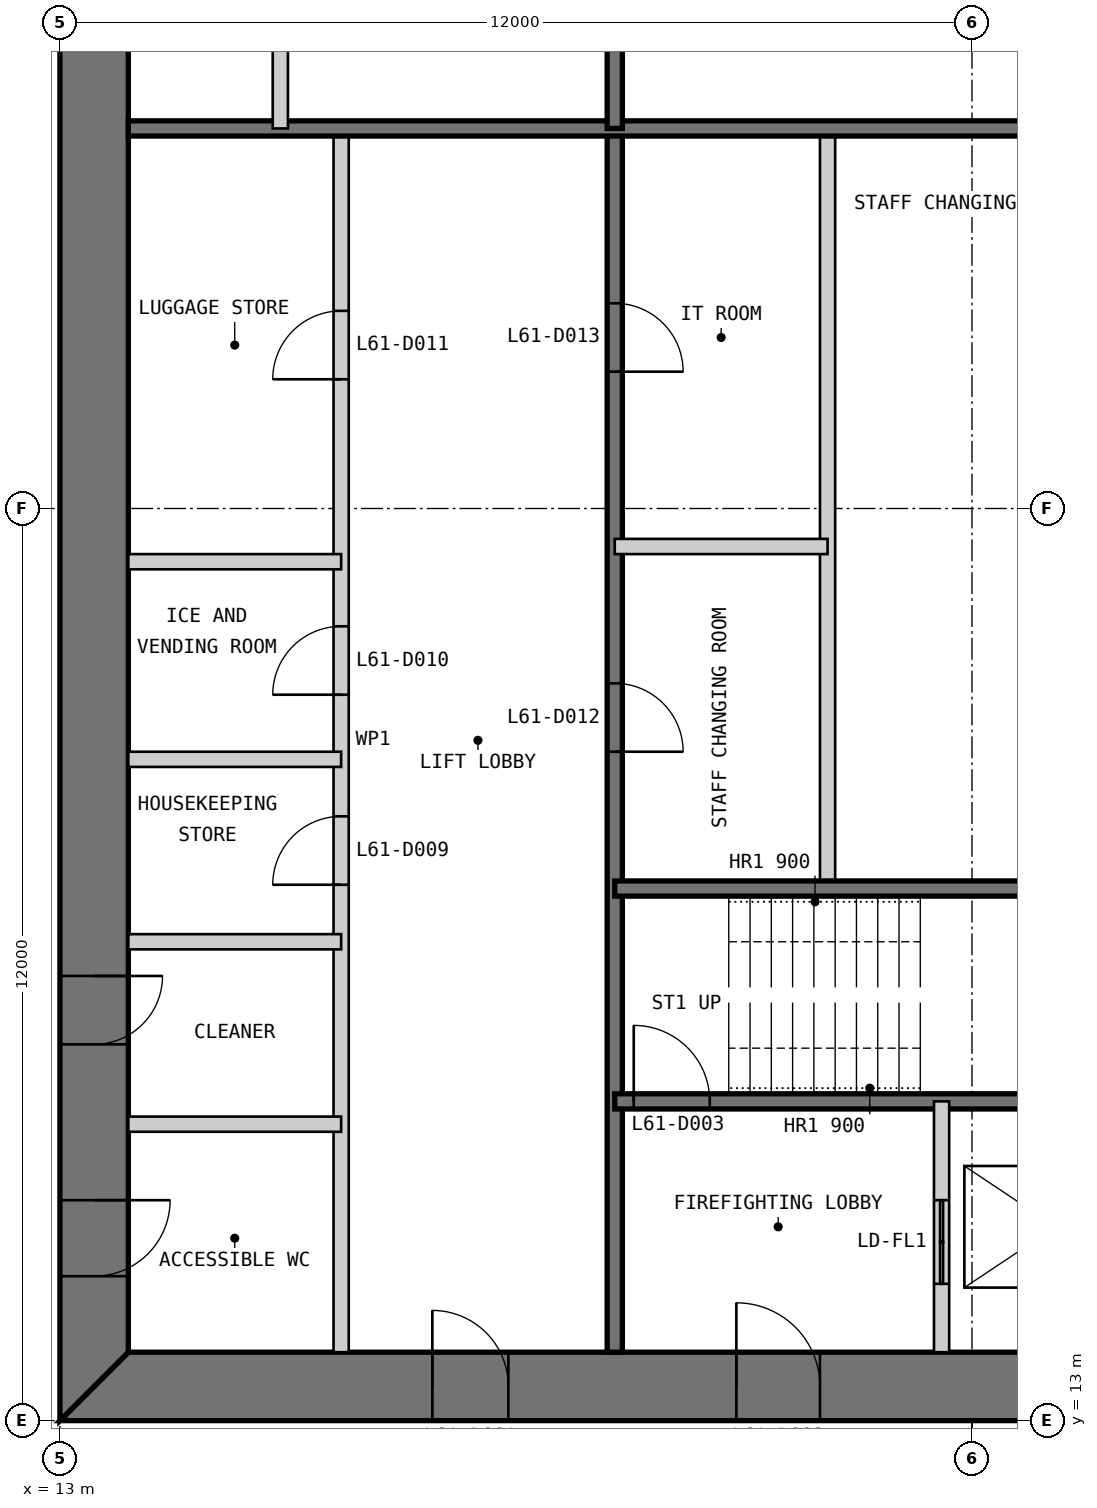
"""IFC4 building model, lengths in metres.
Left out: names, types, materials, properties, quantities, classifications, styles, units other than length and angle.
Written with IfcOpenShell. Run it as: python <this file> out.ifc"""

import sys

from ifc_helpers import new_model, si_unit, direction, frame, frame_2d, origin, place, context, subcontext, project, spatial, polyline, rectangle, outline, extrude, element, fill, save


model = new_model("IFC4")
c1 = context("Model", 3, precision=1e-05, world=origin(), true_north=direction((0.0, 1.0)))
c2 = subcontext(c1, "Body", "Model", "MODEL_VIEW")
j1 = project(units=[si_unit("LENGTHUNIT", "METRE"), si_unit("PLANEANGLEUNIT", "RADIAN")], contexts=[c1])
p1 = place(None, origin())
s1 = spatial("IfcSite", under=j1, at=p1, CompositionType="ELEMENT")
p2 = place(p1, origin())
s2 = spatial("IfcBuilding", under=s1, at=p2, CompositionType="ELEMENT")
p3 = place(p2, frame((0.0, 0.0, 259.4)))
s3 = spatial("IfcBuildingStorey", under=s2, at=p3, CompositionType="ELEMENT", Elevation=259.4)
p4 = place(p3, frame((13.0, 13.45, 0.0), z_axis=(0.0, 0.0, 1.0), x_axis=(1.0, 0.0, 0.0)))
e1 = element("IfcWall", 1, at=p4, inside=s3, PredefinedType="SHEAR", context=c2, shape_type="SweptSolid", body=[
    extrude(outline(polyline([(0.0, -0.45), (24.0, -0.45), (23.1, 0.45), (0.9, 0.45), (0.0, -0.45)])), origin(), (0.0, 0.0, 1.0), 3.4),
])
p5 = place(p4, frame((4.9, 0.0, 0.0)))
e2 = element("IfcOpeningElement", 2, at=p5, cuts=e1, PredefinedType="OPENING", context=c2, shape_type="SweptSolid", body=[
    extrude(rectangle(XDim=1.0, YDim=2.2, at=frame_2d((0.5, 1.1))), frame((0.0, 0.46, 0.0), z_axis=(0.0, -1.0, 0.0), x_axis=(1.0, 0.0, 0.0)), (0.0, 0.0, 1.0), 0.92),
])
p6 = place(p4, frame((8.9, 0.0, 0.0)))
e3 = element("IfcOpeningElement", 3, at=p6, cuts=e1, PredefinedType="OPENING", context=c2, shape_type="SweptSolid", body=[
    extrude(rectangle(XDim=1.1, YDim=2.2, at=frame_2d((0.55, 1.1))), frame((0.0, 0.46, 0.0), z_axis=(0.0, -1.0, 0.0), x_axis=(1.0, 0.0, 0.0)), (0.0, 0.0, 1.0), 0.92),
])
p7 = place(p4, frame((15.05, 0.0, 0.0)))
e4 = element("IfcOpeningElement", 4, at=p7, cuts=e1, PredefinedType="OPENING", context=c2, shape_type="SweptSolid", body=[
    extrude(rectangle(XDim=0.9, YDim=2.2, at=frame_2d((0.45, 1.1))), frame((0.0, 0.46, 0.0), z_axis=(0.0, -1.0, 0.0), x_axis=(1.0, 0.0, 0.0)), (0.0, 0.0, 1.0), 0.92),
])
p8 = place(p4, frame((17.9, 0.0, 0.0)))
e5 = element("IfcOpeningElement", 5, at=p8, cuts=e1, PredefinedType="OPENING", context=c2, shape_type="SweptSolid", body=[
    extrude(rectangle(XDim=1.0, YDim=2.2, at=frame_2d((0.5, 1.1))), frame((0.0, 0.46, 0.0), z_axis=(0.0, -1.0, 0.0), x_axis=(1.0, 0.0, 0.0)), (0.0, 0.0, 1.0), 0.92),
])
p9 = place(p4, frame((21.4, 0.0, 0.0)))
e6 = element("IfcOpeningElement", 6, at=p9, cuts=e1, PredefinedType="OPENING", context=c2, shape_type="SweptSolid", body=[
    extrude(rectangle(XDim=1.0, YDim=2.2, at=frame_2d((0.5, 1.1))), frame((0.0, 0.46, 0.0), z_axis=(0.0, -1.0, 0.0), x_axis=(1.0, 0.0, 0.0)), (0.0, 0.0, 1.0), 0.92),
])
p10 = place(p3, frame((13.45, 36.1, 0.0), z_axis=(0.0, 0.0, 1.0), x_axis=(0.0, -1.0, 0.0)))
e7 = element("IfcWall", 7, at=p10, inside=s3, PredefinedType="SHEAR", context=c2, shape_type="SweptSolid", body=[
    extrude(outline(polyline([(-0.9, -0.45), (23.1, -0.45), (22.2, 0.45), (0.0, 0.45), (-0.9, -0.45)])), origin(), (0.0, 0.0, 1.0), 3.4),
])
p11 = place(p10, frame((20.2, 0.0, 0.0)))
e8 = element("IfcOpeningElement", 8, at=p11, cuts=e7, PredefinedType="OPENING", context=c2, shape_type="SweptSolid", body=[
    extrude(rectangle(XDim=1.0, YDim=2.2, at=frame_2d((0.5, 1.1))), frame((0.0, 0.46, 0.0), z_axis=(0.0, -1.0, 0.0), x_axis=(1.0, 0.0, 0.0)), (0.0, 0.0, 1.0), 0.92),
])
p12 = place(p10, frame((17.25, 0.0, 0.0)))
e9 = element("IfcOpeningElement", 9, at=p12, cuts=e7, PredefinedType="OPENING", context=c2, shape_type="SweptSolid", body=[
    extrude(rectangle(XDim=0.9, YDim=2.2, at=frame_2d((0.45, 1.1))), frame((0.0, 0.46, 0.0), z_axis=(0.0, -1.0, 0.0), x_axis=(1.0, 0.0, 0.0)), (0.0, 0.0, 1.0), 0.92),
])
p13 = place(p3, frame((16.7, 13.9, 0.0), z_axis=(0.0, 0.0, 1.0), x_axis=(0.0, 1.0, 0.0)))
e10 = element("IfcWall", 10, at=p13, inside=s3, PredefinedType="PARTITIONING", context=c2, shape_type="SweptSolid", body=[
    extrude(rectangle(XDim=16.1, YDim=0.2, at=frame_2d((8.05, 0.0))), origin(), (0.0, 0.0, 1.0), 3.2),
])
p14 = place(p13, frame((6.15, 0.0, 0.0)))
e11 = element("IfcOpeningElement", 11, at=p14, cuts=e10, PredefinedType="OPENING", context=c2, shape_type="SweptSolid", body=[
    extrude(rectangle(XDim=0.9, YDim=2.2, at=frame_2d((0.45, 1.1))), frame((0.0, 0.11, 0.0), z_axis=(0.0, -1.0, 0.0), x_axis=(1.0, 0.0, 0.0)), (0.0, 0.0, 1.0), 0.22),
])
p15 = place(p13, frame((8.65, 0.0, 0.0)))
e12 = element("IfcOpeningElement", 12, at=p15, cuts=e10, PredefinedType="OPENING", context=c2, shape_type="SweptSolid", body=[
    extrude(rectangle(XDim=0.9, YDim=2.2, at=frame_2d((0.45, 1.1))), frame((0.0, 0.11, 0.0), z_axis=(0.0, -1.0, 0.0), x_axis=(1.0, 0.0, 0.0)), (0.0, 0.0, 1.0), 0.22),
])
p16 = place(p13, frame((12.8, 0.0, 0.0)))
e13 = element("IfcOpeningElement", 13, at=p16, cuts=e10, PredefinedType="OPENING", context=c2, shape_type="SweptSolid", body=[
    extrude(rectangle(XDim=0.9, YDim=2.2, at=frame_2d((0.45, 1.1))), frame((0.0, 0.11, 0.0), z_axis=(0.0, -1.0, 0.0), x_axis=(1.0, 0.0, 0.0)), (0.0, 0.0, 1.0), 0.22),
])
p17 = place(p3, frame((20.3, 13.9, 0.0), z_axis=(0.0, 0.0, 1.0), x_axis=(0.0, 1.0, 0.0)))
e14 = element("IfcWall", 14, at=p17, inside=s3, PredefinedType="SOLIDWALL", context=c2, shape_type="SweptSolid", body=[
    extrude(rectangle(XDim=16.1, YDim=0.2, at=frame_2d((8.05, 0.0))), origin(), (0.0, 0.0, 1.0), 3.2),
])
p18 = place(p17, frame((7.9, 0.0, 0.0)))
e15 = element("IfcOpeningElement", 15, at=p18, cuts=e14, PredefinedType="OPENING", context=c2, shape_type="SweptSolid", body=[
    extrude(rectangle(XDim=0.9, YDim=2.2, at=frame_2d((0.45, 1.1))), frame((0.0, 0.11, 0.0), z_axis=(0.0, -1.0, 0.0), x_axis=(1.0, 0.0, 0.0)), (0.0, 0.0, 1.0), 0.22),
])
p19 = place(p17, frame((12.9, 0.0, 0.0)))
e16 = element("IfcOpeningElement", 16, at=p19, cuts=e14, PredefinedType="OPENING", context=c2, shape_type="SweptSolid", body=[
    extrude(rectangle(XDim=0.9, YDim=2.2, at=frame_2d((0.45, 1.1))), frame((0.0, 0.11, 0.0), z_axis=(0.0, -1.0, 0.0), x_axis=(1.0, 0.0, 0.0)), (0.0, 0.0, 1.0), 0.22),
])
p20 = place(p3, frame((23.1, 20.0, 0.0), z_axis=(0.0, 0.0, 1.0), x_axis=(0.0, 1.0, 0.0)))
e17 = element("IfcWall", 17, at=p20, inside=s3, PredefinedType="PARTITIONING", context=c2, shape_type="SweptSolid", body=[
    extrude(rectangle(XDim=10.0, YDim=0.2, at=frame_2d((5.0, 0.0))), origin(), (0.0, 0.0, 1.0), 3.2),
])
p21 = place(p3, frame((20.3, 17.2, 0.0), z_axis=(0.0, 0.0, 1.0), x_axis=(1.0, 0.0, 0.0)))
e18 = element("IfcWall", 18, at=p21, inside=s3, PredefinedType="SOLIDWALL", context=c2, shape_type="SweptSolid", body=[
    extrude(rectangle(XDim=9.4, YDim=0.2, at=frame_2d((4.7, 0.0))), origin(), (0.0, 0.0, 1.0), 3.2),
])
p22 = place(p21, frame((0.25, 0.0, 0.0)))
e19 = element("IfcOpeningElement", 19, at=p22, cuts=e18, PredefinedType="OPENING", context=c2, shape_type="SweptSolid", body=[
    extrude(rectangle(XDim=1.0, YDim=2.2, at=frame_2d((0.5, 1.1))), frame((0.0, 0.11, 0.0), z_axis=(0.0, -1.0, 0.0), x_axis=(1.0, 0.0, 0.0)), (0.0, 0.0, 1.0), 0.22),
])
p23 = place(p3, frame((20.3, 20.0, 0.0), z_axis=(0.0, 0.0, 1.0), x_axis=(1.0, 0.0, 0.0)))
e20 = element("IfcWall", 20, at=p23, inside=s3, PredefinedType="SOLIDWALL", context=c2, shape_type="SweptSolid", body=[
    extrude(rectangle(XDim=15.8, YDim=0.2, at=frame_2d((7.9, 0.0))), origin(), (0.0, 0.0, 1.0), 3.2),
])
p24 = place(p3, frame((24.6, 13.9, 0.0), z_axis=(0.0, 0.0, 1.0), x_axis=(0.0, 1.0, 0.0)))
e21 = element("IfcWall", 21, at=p24, inside=s3, PredefinedType="PARTITIONING", context=c2, shape_type="SweptSolid", body=[
    extrude(rectangle(XDim=3.3, YDim=0.2, at=frame_2d((1.65, 0.0))), origin(), (0.0, 0.0, 1.0), 3.2),
])
p25 = place(p24, frame((0.9, 0.0, 0.0)))
e22 = element("IfcOpeningElement", 22, at=p25, cuts=e21, PredefinedType="OPENING", context=c2, shape_type="SweptSolid", body=[
    extrude(rectangle(XDim=1.1, YDim=2.2, at=frame_2d((0.55, 1.1))), frame((0.0, 0.11, 0.0), z_axis=(0.0, -1.0, 0.0), x_axis=(1.0, 0.0, 0.0)), (0.0, 0.0, 1.0), 0.22),
])
for number, where, z_axis, x_axis in (
    (23, (13.9, 16.9, 0.0), (0.0, 0.0, 1.0), (1.0, 0.0, 0.0)),
    (24, (13.9, 19.3, 0.0), (0.0, 0.0, 1.0), (1.0, 0.0, 0.0)),
    (25, (13.9, 21.7, 0.0), (0.0, 0.0, 1.0), (1.0, 0.0, 0.0)),
    (26, (13.9, 24.3, 0.0), (0.0, 0.0, 1.0), (1.0, 0.0, 0.0)),
    (27, (20.3, 24.5, 0.0), (0.0, 0.0, 1.0), (1.0, 0.0, 0.0)),
):
    element("IfcWall", number, at=place(p3, frame(where, z_axis=z_axis, x_axis=x_axis)), inside=s3, PredefinedType="PARTITIONING", context=c2, shape_type="SweptSolid", body=[
        extrude(rectangle(XDim=2.8, YDim=0.2, at=frame_2d((1.4, 0.0))), origin(), (0.0, 0.0, 1.0), 3.2),
    ])
p26 = place(p3, frame((29.7, 30.0, 0.0), z_axis=(0.0, 0.0, 1.0), x_axis=(-1.0, 0.0, 0.0)))
e28 = element("IfcWall", 28, at=p26, inside=s3, PredefinedType="SOLIDWALL", context=c2, shape_type="SweptSolid", body=[
    extrude(rectangle(XDim=15.8, YDim=0.2, at=frame_2d((7.9, 0.0))), origin(), (0.0, 0.0, 1.0), 3.2),
])
p27 = place(p3, frame((20.3, 36.1, 0.0), z_axis=(0.0, 0.0, 1.0), x_axis=(0.0, -1.0, 0.0)))
e29 = element("IfcWall", 29, at=p27, inside=s3, PredefinedType="SOLIDWALL", context=c2, shape_type="SweptSolid", body=[
    extrude(rectangle(XDim=6.1, YDim=0.2, at=frame_2d((3.05, 0.0))), origin(), (0.0, 0.0, 1.0), 3.2),
])
p28 = place(p3, frame((15.9, 36.1, 0.0), z_axis=(0.0, 0.0, 1.0), x_axis=(0.0, -1.0, 0.0)))
e30 = element("IfcWall", 30, at=p28, inside=s3, PredefinedType="PARTITIONING", context=c2, shape_type="SweptSolid", body=[
    extrude(rectangle(XDim=6.1, YDim=0.2, at=frame_2d((3.05, 0.0))), origin(), (0.0, 0.0, 1.0), 3.2),
])
p29 = place(p5, origin())
e31 = element("IfcDoor", 31, at=p29, inside=s3, OperationType="SINGLE_SWING_LEFT", PredefinedType="DOOR", context=c2, shape_type="SweptSolid", body=[
    extrude(rectangle(XDim=1.0, YDim=2.2, at=frame_2d((0.5, 1.1))), frame((0.0, 0.025, 0.0), z_axis=(0.0, -1.0, 0.0), x_axis=(1.0, 0.0, 0.0)), (0.0, 0.0, 1.0), 0.05),
    extrude(outline(polyline([(0.0, 0.0), (0.04, 0.0), (0.04, 2.16), (0.96, 2.16), (0.96, 0.0), (1.0, 0.0), (1.0, 2.2), (0.0, 2.2), (0.0, 0.0)])), frame((0.0, 0.3, 0.0), z_axis=(0.0, -1.0, 0.0), x_axis=(1.0, 0.0, 0.0)), (0.0, 0.0, 1.0), 0.6),
])
fill(e2, e31)
p30 = place(p6, origin())
e32 = element("IfcDoor", 32, at=p30, inside=s3, OperationType="SINGLE_SWING_LEFT", PredefinedType="DOOR", context=c2, shape_type="SweptSolid", body=[
    extrude(rectangle(XDim=1.1, YDim=2.2, at=frame_2d((0.55, 1.1))), frame((0.0, 0.025, 0.0), z_axis=(0.0, -1.0, 0.0), x_axis=(1.0, 0.0, 0.0)), (0.0, 0.0, 1.0), 0.05),
    extrude(outline(polyline([(0.0, 0.0), (0.04, 0.0), (0.04, 2.16), (1.06, 2.16), (1.06, 0.0), (1.1, 0.0), (1.1, 2.2), (0.0, 2.2), (0.0, 0.0)])), frame((0.0, 0.3, 0.0), z_axis=(0.0, -1.0, 0.0), x_axis=(1.0, 0.0, 0.0)), (0.0, 0.0, 1.0), 0.6),
])
fill(e3, e32)
p31 = place(p22, origin())
e33 = element("IfcDoor", 33, at=p31, inside=s3, OperationType="SINGLE_SWING_LEFT", PredefinedType="DOOR", context=c2, shape_type="SweptSolid", body=[
    extrude(rectangle(XDim=1.0, YDim=2.2, at=frame_2d((0.5, 1.1))), frame((0.0, 0.025, 0.0), z_axis=(0.0, -1.0, 0.0), x_axis=(1.0, 0.0, 0.0)), (0.0, 0.0, 1.0), 0.05),
])
fill(e19, e33)
p32 = place(p11, origin())
e34 = element("IfcDoor", 34, at=p32, inside=s3, OperationType="SINGLE_SWING_LEFT", PredefinedType="DOOR", context=c2, shape_type="SweptSolid", body=[
    extrude(rectangle(XDim=1.0, YDim=2.2, at=frame_2d((0.5, 1.1))), frame((0.0, 0.025, 0.0), z_axis=(0.0, -1.0, 0.0), x_axis=(1.0, 0.0, 0.0)), (0.0, 0.0, 1.0), 0.05),
    extrude(outline(polyline([(0.0, 0.0), (0.04, 0.0), (0.04, 2.16), (0.96, 2.16), (0.96, 0.0), (1.0, 0.0), (1.0, 2.2), (0.0, 2.2), (0.0, 0.0)])), frame((0.0, 0.3, 0.0), z_axis=(0.0, -1.0, 0.0), x_axis=(1.0, 0.0, 0.0)), (0.0, 0.0, 1.0), 0.6),
])
fill(e8, e34)
p33 = place(p12, origin())
e35 = element("IfcDoor", 35, at=p33, inside=s3, OperationType="SINGLE_SWING_LEFT", PredefinedType="DOOR", context=c2, shape_type="SweptSolid", body=[
    extrude(rectangle(XDim=0.9, YDim=2.2, at=frame_2d((0.45, 1.1))), frame((0.0, 0.025, 0.0), z_axis=(0.0, -1.0, 0.0), x_axis=(1.0, 0.0, 0.0)), (0.0, 0.0, 1.0), 0.05),
    extrude(outline(polyline([(0.0, 0.0), (0.04, 0.0), (0.04, 2.16), (0.86, 2.16), (0.86, 0.0), (0.9, 0.0), (0.9, 2.2), (0.0, 2.2), (0.0, 0.0)])), frame((0.0, 0.3, 0.0), z_axis=(0.0, -1.0, 0.0), x_axis=(1.0, 0.0, 0.0)), (0.0, 0.0, 1.0), 0.6),
])
fill(e9, e35)
p34 = place(p14, origin())
e36 = element("IfcDoor", 36, at=p34, inside=s3, OperationType="SINGLE_SWING_LEFT", PredefinedType="DOOR", context=c2, shape_type="SweptSolid", body=[
    extrude(rectangle(XDim=0.9, YDim=2.2, at=frame_2d((0.45, 1.1))), frame((0.0, 0.025, 0.0), z_axis=(0.0, -1.0, 0.0), x_axis=(1.0, 0.0, 0.0)), (0.0, 0.0, 1.0), 0.05),
])
fill(e11, e36)
p35 = place(p15, origin())
e37 = element("IfcDoor", 37, at=p35, inside=s3, OperationType="SINGLE_SWING_LEFT", PredefinedType="DOOR", context=c2, shape_type="SweptSolid", body=[
    extrude(rectangle(XDim=0.9, YDim=2.2, at=frame_2d((0.45, 1.1))), frame((0.0, 0.025, 0.0), z_axis=(0.0, -1.0, 0.0), x_axis=(1.0, 0.0, 0.0)), (0.0, 0.0, 1.0), 0.05),
])
fill(e12, e37)
p36 = place(p16, origin())
e38 = element("IfcDoor", 38, at=p36, inside=s3, OperationType="SINGLE_SWING_LEFT", PredefinedType="DOOR", context=c2, shape_type="SweptSolid", body=[
    extrude(rectangle(XDim=0.9, YDim=2.2, at=frame_2d((0.45, 1.1))), frame((0.0, 0.025, 0.0), z_axis=(0.0, -1.0, 0.0), x_axis=(1.0, 0.0, 0.0)), (0.0, 0.0, 1.0), 0.05),
])
fill(e13, e38)
p37 = place(p18, frame((0.9, 0.0, 0.0), z_axis=(0.0, 0.0, 1.0), x_axis=(-1.0, 0.0, 0.0)))
e39 = element("IfcDoor", 39, at=p37, inside=s3, OperationType="SINGLE_SWING_RIGHT", PredefinedType="DOOR", context=c2, shape_type="SweptSolid", body=[
    extrude(rectangle(XDim=0.9, YDim=2.2, at=frame_2d((0.45, 1.1))), frame((0.0, 0.025, 0.0), z_axis=(0.0, -1.0, 0.0), x_axis=(1.0, 0.0, 0.0)), (0.0, 0.0, 1.0), 0.05),
])
fill(e15, e39)
p38 = place(p19, frame((0.9, 0.0, 0.0), z_axis=(0.0, 0.0, 1.0), x_axis=(-1.0, 0.0, 0.0)))
e40 = element("IfcDoor", 40, at=p38, inside=s3, OperationType="SINGLE_SWING_RIGHT", PredefinedType="DOOR", context=c2, shape_type="SweptSolid", body=[
    extrude(rectangle(XDim=0.9, YDim=2.2, at=frame_2d((0.45, 1.1))), frame((0.0, 0.025, 0.0), z_axis=(0.0, -1.0, 0.0), x_axis=(1.0, 0.0, 0.0)), (0.0, 0.0, 1.0), 0.05),
])
fill(e16, e40)
p39 = place(p25, origin())
e41 = element("IfcDoor", 41, at=p39, inside=s3, OperationType="DOUBLE_DOOR_SLIDING", PredefinedType="DOOR", context=c2, shape_type="SweptSolid", body=[
    extrude(rectangle(XDim=1.1, YDim=2.2, at=frame_2d((0.55, 1.1))), frame((0.0, 0.025, 0.0), z_axis=(0.0, -1.0, 0.0), x_axis=(1.0, 0.0, 0.0)), (0.0, 0.0, 1.0), 0.05),
])
fill(e22, e41)
save(model, sys.argv[1])
